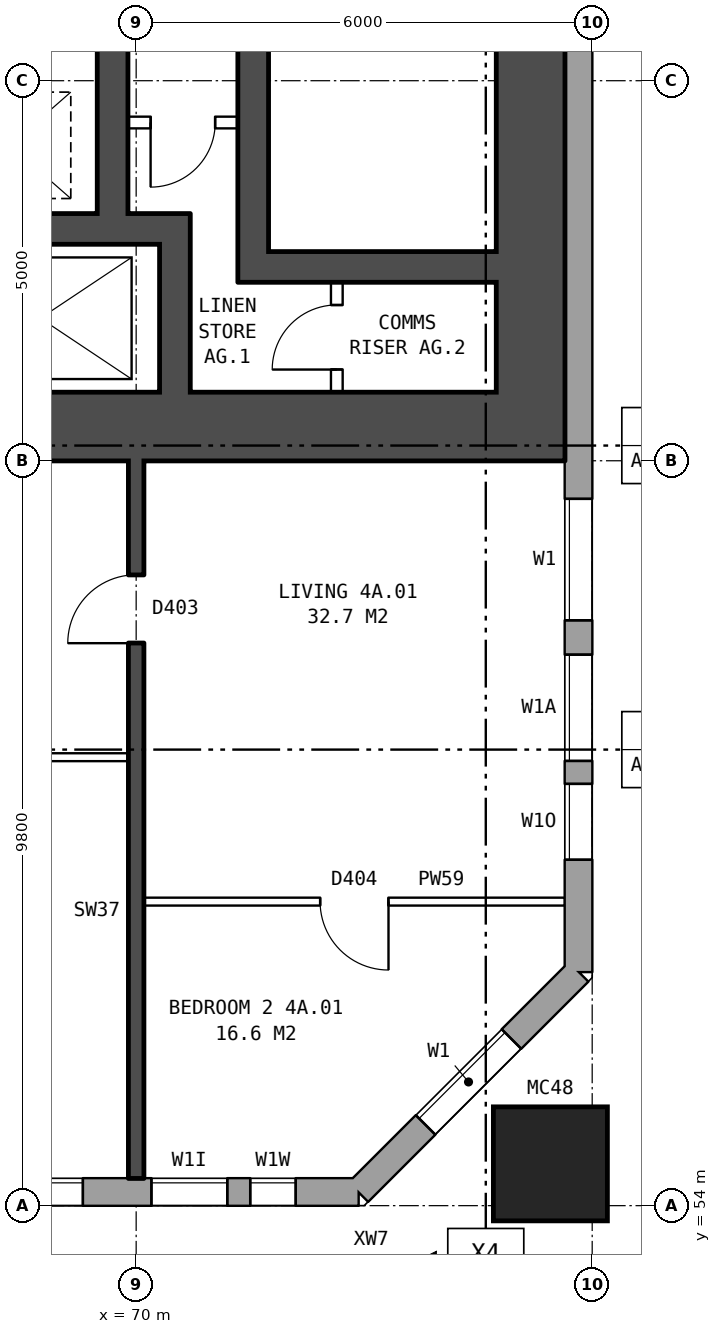
"""IFC4 building model, lengths in metres.
Left out: names, types, materials, properties, quantities, classifications, styles, units other than length and angle.
Written with IfcOpenShell. Run it as: python <this file> out.ifc"""

import sys

from ifc_helpers import new_model, si_unit, direction, frame, frame_2d, origin, origin_2d, place, context, subcontext, project, spatial, rectangle, hollow_rectangle, extrude, element, fill, save


model = new_model("IFC4")
c1 = context("Model", 3, precision=1e-05, world=origin(), true_north=direction((0.0, 1.0)))
c2 = subcontext(c1, "Body", "Model", "MODEL_VIEW")
j1 = project(units=[si_unit("LENGTHUNIT", "METRE"), si_unit("PLANEANGLEUNIT", "RADIAN")], contexts=[c1])
p1 = place(None, origin())
s1 = spatial("IfcSite", under=j1, at=p1, CompositionType="ELEMENT")
p2 = place(p1, origin())
s2 = spatial("IfcBuilding", under=s1, at=p2, CompositionType="ELEMENT")
p3 = place(p2, frame((0.0, 0.0, 19.5)))
s3 = spatial("IfcBuildingStorey", under=s2, at=p3, CompositionType="ELEMENT", Elevation=19.5)
p4 = place(p3, frame((75.45, 54.55, 0.0), z_axis=(0.0, 0.0, 1.0), x_axis=(1.0, 0.0, 0.0)))
e1 = element("IfcColumn", 1, at=p4, inside=s3, PredefinedType="COLUMN", context=c2, shape_type="SweptSolid", body=[
    extrude(hollow_rectangle(XDim=1.5, YDim=1.5, WallThickness=0.08, at=origin_2d()), origin(), (0.0, 0.0, 1.0), 3.1),
])
p5 = place(p3, frame((22.825, 54.18, 0.0), z_axis=(0.0, 0.0, 1.0), x_axis=(1.0, 0.0, 0.0)))
e2 = element("IfcWall", 2, at=p5, inside=s3, PredefinedType="STANDARD", context=c2, shape_type="SweptSolid", body=[
    extrude(rectangle(XDim=50.101, YDim=0.36, at=frame_2d((25.05, 0.0))), origin(), (0.0, 0.0, 1.0), 2.85),
])
p6 = place(p5, frame((2.875, 0.0, 0.8)))
e3 = element("IfcOpeningElement", 3, at=p6, cuts=e2, PredefinedType="OPENING", context=c2, shape_type="SweptSolid", body=[
    extrude(rectangle(XDim=1.6, YDim=1.8, at=frame_2d((0.8, 0.9))), frame((0.0, 0.19, 0.0), z_axis=(0.0, -1.0, 0.0), x_axis=(1.0, 0.0, 0.0)), (0.0, 0.0, 1.0), 0.38),
])
p7 = place(p5, frame((5.875, 0.0, 0.8)))
e4 = element("IfcOpeningElement", 4, at=p7, cuts=e2, PredefinedType="OPENING", context=c2, shape_type="SweptSolid", body=[
    extrude(rectangle(XDim=1.6, YDim=1.8, at=frame_2d((0.8, 0.9))), frame((0.0, 0.19, 0.0), z_axis=(0.0, -1.0, 0.0), x_axis=(1.0, 0.0, 0.0)), (0.0, 0.0, 1.0), 0.38),
])
p8 = place(p5, frame((8.875, 0.0, 0.8)))
e5 = element("IfcOpeningElement", 5, at=p8, cuts=e2, PredefinedType="OPENING", context=c2, shape_type="SweptSolid", body=[
    extrude(rectangle(XDim=1.6, YDim=1.8, at=frame_2d((0.8, 0.9))), frame((0.0, 0.19, 0.0), z_axis=(0.0, -1.0, 0.0), x_axis=(1.0, 0.0, 0.0)), (0.0, 0.0, 1.0), 0.38),
])
p9 = place(p5, frame((11.875, 0.0, 0.8)))
e6 = element("IfcOpeningElement", 6, at=p9, cuts=e2, PredefinedType="OPENING", context=c2, shape_type="SweptSolid", body=[
    extrude(rectangle(XDim=1.6, YDim=1.8, at=frame_2d((0.8, 0.9))), frame((0.0, 0.19, 0.0), z_axis=(0.0, -1.0, 0.0), x_axis=(1.0, 0.0, 0.0)), (0.0, 0.0, 1.0), 0.38),
])
p10 = place(p5, frame((14.875, 0.0, 0.8)))
e7 = element("IfcOpeningElement", 7, at=p10, cuts=e2, PredefinedType="OPENING", context=c2, shape_type="SweptSolid", body=[
    extrude(rectangle(XDim=1.6, YDim=1.8, at=frame_2d((0.8, 0.9))), frame((0.0, 0.19, 0.0), z_axis=(0.0, -1.0, 0.0), x_axis=(1.0, 0.0, 0.0)), (0.0, 0.0, 1.0), 0.38),
])
p11 = place(p5, frame((17.875, 0.0, 0.8)))
e8 = element("IfcOpeningElement", 8, at=p11, cuts=e2, PredefinedType="OPENING", context=c2, shape_type="SweptSolid", body=[
    extrude(rectangle(XDim=1.6, YDim=1.8, at=frame_2d((0.8, 0.9))), frame((0.0, 0.19, 0.0), z_axis=(0.0, -1.0, 0.0), x_axis=(1.0, 0.0, 0.0)), (0.0, 0.0, 1.0), 0.38),
])
p12 = place(p5, frame((20.875, 0.0, 0.8)))
e9 = element("IfcOpeningElement", 9, at=p12, cuts=e2, PredefinedType="OPENING", context=c2, shape_type="SweptSolid", body=[
    extrude(rectangle(XDim=1.6, YDim=1.8, at=frame_2d((0.8, 0.9))), frame((0.0, 0.19, 0.0), z_axis=(0.0, -1.0, 0.0), x_axis=(1.0, 0.0, 0.0)), (0.0, 0.0, 1.0), 0.38),
])
p13 = place(p5, frame((23.875, 0.0, 0.8)))
e10 = element("IfcOpeningElement", 10, at=p13, cuts=e2, PredefinedType="OPENING", context=c2, shape_type="SweptSolid", body=[
    extrude(rectangle(XDim=1.6, YDim=1.8, at=frame_2d((0.8, 0.9))), frame((0.0, 0.19, 0.0), z_axis=(0.0, -1.0, 0.0), x_axis=(1.0, 0.0, 0.0)), (0.0, 0.0, 1.0), 0.38),
])
p14 = place(p5, frame((26.875, 0.0, 0.8)))
e11 = element("IfcOpeningElement", 11, at=p14, cuts=e2, PredefinedType="OPENING", context=c2, shape_type="SweptSolid", body=[
    extrude(rectangle(XDim=1.6, YDim=1.8, at=frame_2d((0.8, 0.9))), frame((0.0, 0.19, 0.0), z_axis=(0.0, -1.0, 0.0), x_axis=(1.0, 0.0, 0.0)), (0.0, 0.0, 1.0), 0.38),
])
p15 = place(p5, frame((29.875, 0.0, 0.8)))
e12 = element("IfcOpeningElement", 12, at=p15, cuts=e2, PredefinedType="OPENING", context=c2, shape_type="SweptSolid", body=[
    extrude(rectangle(XDim=1.6, YDim=1.8, at=frame_2d((0.8, 0.9))), frame((0.0, 0.19, 0.0), z_axis=(0.0, -1.0, 0.0), x_axis=(1.0, 0.0, 0.0)), (0.0, 0.0, 1.0), 0.38),
])
p16 = place(p5, frame((32.875, 0.0, 0.8)))
e13 = element("IfcOpeningElement", 13, at=p16, cuts=e2, PredefinedType="OPENING", context=c2, shape_type="SweptSolid", body=[
    extrude(rectangle(XDim=1.6, YDim=1.8, at=frame_2d((0.8, 0.9))), frame((0.0, 0.19, 0.0), z_axis=(0.0, -1.0, 0.0), x_axis=(1.0, 0.0, 0.0)), (0.0, 0.0, 1.0), 0.38),
])
p17 = place(p5, frame((35.875, 0.0, 0.8)))
e14 = element("IfcOpeningElement", 14, at=p17, cuts=e2, PredefinedType="OPENING", context=c2, shape_type="SweptSolid", body=[
    extrude(rectangle(XDim=1.6, YDim=1.8, at=frame_2d((0.8, 0.9))), frame((0.0, 0.19, 0.0), z_axis=(0.0, -1.0, 0.0), x_axis=(1.0, 0.0, 0.0)), (0.0, 0.0, 1.0), 0.38),
])
p18 = place(p5, frame((38.875, 0.0, 0.8)))
e15 = element("IfcOpeningElement", 15, at=p18, cuts=e2, PredefinedType="OPENING", context=c2, shape_type="SweptSolid", body=[
    extrude(rectangle(XDim=1.6, YDim=1.8, at=frame_2d((0.8, 0.9))), frame((0.0, 0.19, 0.0), z_axis=(0.0, -1.0, 0.0), x_axis=(1.0, 0.0, 0.0)), (0.0, 0.0, 1.0), 0.38),
])
p19 = place(p5, frame((41.875, 0.0, 0.8)))
e16 = element("IfcOpeningElement", 16, at=p19, cuts=e2, PredefinedType="OPENING", context=c2, shape_type="SweptSolid", body=[
    extrude(rectangle(XDim=1.6, YDim=1.8, at=frame_2d((0.8, 0.9))), frame((0.0, 0.19, 0.0), z_axis=(0.0, -1.0, 0.0), x_axis=(1.0, 0.0, 0.0)), (0.0, 0.0, 1.0), 0.38),
])
p20 = place(p5, frame((44.875, 0.0, 0.8)))
e17 = element("IfcOpeningElement", 17, at=p20, cuts=e2, PredefinedType="OPENING", context=c2, shape_type="SweptSolid", body=[
    extrude(rectangle(XDim=1.6, YDim=1.8, at=frame_2d((0.8, 0.9))), frame((0.0, 0.19, 0.0), z_axis=(0.0, -1.0, 0.0), x_axis=(1.0, 0.0, 0.0)), (0.0, 0.0, 1.0), 0.38),
])
p21 = place(p5, frame((47.375, 0.0, 0.8)))
e18 = element("IfcOpeningElement", 18, at=p21, cuts=e2, PredefinedType="OPENING", context=c2, shape_type="SweptSolid", body=[
    extrude(rectangle(XDim=1.0, YDim=1.5, at=frame_2d((0.5, 0.75))), frame((0.0, 0.19, 0.0), z_axis=(0.0, -1.0, 0.0), x_axis=(1.0, 0.0, 0.0)), (0.0, 0.0, 1.0), 0.38),
])
p22 = place(p5, frame((48.675, 0.0, 0.8)))
e19 = element("IfcOpeningElement", 19, at=p22, cuts=e2, PredefinedType="OPENING", context=c2, shape_type="SweptSolid", body=[
    extrude(rectangle(XDim=0.6, YDim=0.9, at=frame_2d((0.3, 0.45))), frame((0.0, 0.19, 0.0), z_axis=(0.0, -1.0, 0.0), x_axis=(1.0, 0.0, 0.0)), (0.0, 0.0, 1.0), 0.38),
])
p23 = place(p3, frame((72.925, 54.18, 0.0), z_axis=(0.0, 0.0, 1.0), x_axis=(0.707106781187, 0.707106781187, 0.0)))
e20 = element("IfcWall", 20, at=p23, inside=s3, PredefinedType="STANDARD", context=c2, shape_type="SweptSolid", body=[
    extrude(rectangle(XDim=4.094, YDim=0.36, at=frame_2d((2.047, 0.0))), origin(), (0.0, 0.0, 1.0), 2.85),
])
p24 = place(p23, frame((1.247, 0.0, 0.8)))
e21 = element("IfcOpeningElement", 21, at=p24, cuts=e20, PredefinedType="OPENING", context=c2, shape_type="SweptSolid", body=[
    extrude(rectangle(XDim=1.6, YDim=1.8, at=frame_2d((0.8, 0.9))), frame((0.0, 0.19, 0.0), z_axis=(0.0, -1.0, 0.0), x_axis=(1.0, 0.0, 0.0)), (0.0, 0.0, 1.0), 0.38),
])
p25 = place(p3, frame((75.82, 57.075, 0.0), z_axis=(0.0, 0.0, 1.0), x_axis=(0.0, 1.0, 0.0)))
e22 = element("IfcWall", 22, at=p25, inside=s3, PredefinedType="STANDARD", context=c2, shape_type="SweptSolid", body=[
    extrude(rectangle(XDim=25.851, YDim=0.36, at=frame_2d((12.925, 0.0))), origin(), (0.0, 0.0, 1.0), 2.85),
])
p26 = place(p25, frame((1.475, 0.0, 0.8)))
e23 = element("IfcOpeningElement", 23, at=p26, cuts=e22, PredefinedType="OPENING", context=c2, shape_type="SweptSolid", body=[
    extrude(rectangle(XDim=1.0, YDim=1.2, at=frame_2d((0.5, 0.6))), frame((0.0, 0.19, 0.0), z_axis=(0.0, -1.0, 0.0), x_axis=(1.0, 0.0, 0.0)), (0.0, 0.0, 1.0), 0.38),
])
p27 = place(p25, frame((4.625, 0.0, 0.8)))
e24 = element("IfcOpeningElement", 24, at=p27, cuts=e22, PredefinedType="OPENING", context=c2, shape_type="SweptSolid", body=[
    extrude(rectangle(XDim=1.6, YDim=1.8, at=frame_2d((0.8, 0.9))), frame((0.0, 0.19, 0.0), z_axis=(0.0, -1.0, 0.0), x_axis=(1.0, 0.0, 0.0)), (0.0, 0.0, 1.0), 0.38),
])
p28 = place(p25, frame((19.625, 0.0, 0.8)))
e25 = element("IfcOpeningElement", 25, at=p28, cuts=e22, PredefinedType="OPENING", context=c2, shape_type="SweptSolid", body=[
    extrude(rectangle(XDim=1.6, YDim=1.8, at=frame_2d((0.8, 0.9))), frame((0.0, 0.19, 0.0), z_axis=(0.0, -1.0, 0.0), x_axis=(1.0, 0.0, 0.0)), (0.0, 0.0, 1.0), 0.38),
])
p29 = place(p25, frame((21.525, 0.0, 0.8)))
e26 = element("IfcOpeningElement", 26, at=p29, cuts=e22, PredefinedType="OPENING", context=c2, shape_type="SweptSolid", body=[
    extrude(rectangle(XDim=1.4, YDim=1.8, at=frame_2d((0.7, 0.9))), frame((0.0, 0.19, 0.0), z_axis=(0.0, -1.0, 0.0), x_axis=(1.0, 0.0, 0.0)), (0.0, 0.0, 1.0), 0.38),
])
p30 = place(p25, frame((2.775, 0.0, 0.8)))
e27 = element("IfcOpeningElement", 27, at=p30, cuts=e22, PredefinedType="OPENING", context=c2, shape_type="SweptSolid", body=[
    extrude(rectangle(XDim=1.4, YDim=1.8, at=frame_2d((0.7, 0.9))), frame((0.0, 0.19, 0.0), z_axis=(0.0, -1.0, 0.0), x_axis=(1.0, 0.0, 0.0)), (0.0, 0.0, 1.0), 0.38),
])
p31 = place(p25, frame((23.225, 0.0, 0.8)))
e28 = element("IfcOpeningElement", 28, at=p31, cuts=e22, PredefinedType="OPENING", context=c2, shape_type="SweptSolid", body=[
    extrude(rectangle(XDim=1.0, YDim=1.2, at=frame_2d((0.5, 0.6))), frame((0.0, 0.19, 0.0), z_axis=(0.0, -1.0, 0.0), x_axis=(1.0, 0.0, 0.0)), (0.0, 0.0, 1.0), 0.38),
])
p32 = place(p3, frame((75.19, 64.7, 0.0), z_axis=(0.0, 0.0, 1.0), x_axis=(0.0, 1.0, 0.0)))
e29 = element("IfcWall", 29, at=p32, inside=s3, PredefinedType="SHEAR", context=c2, shape_type="SweptSolid", body=[
    extrude(rectangle(XDim=10.6, YDim=0.9, at=frame_2d((5.3, 0.0))), origin(), (0.0, 0.0, 1.0), 2.85),
])
p33 = place(p3, frame((66.64, 64.25, 0.0), z_axis=(0.0, 0.0, 1.0), x_axis=(1.0, 0.0, 0.0)))
e30 = element("IfcWall", 30, at=p33, inside=s3, PredefinedType="SHEAR", context=c2, shape_type="SweptSolid", body=[
    extrude(rectangle(XDim=9.0, YDim=0.9, at=frame_2d((4.5, 0.0))), origin(), (0.0, 0.0, 1.0), 2.85),
])
p34 = place(p3, frame((71.74, 66.35, 0.0), z_axis=(0.0, 0.0, 1.0), x_axis=(1.0, 0.0, 0.0)))
e31 = element("IfcWall", 31, at=p34, inside=s3, PredefinedType="SHEAR", context=c2, shape_type="SweptSolid", body=[
    extrude(rectangle(XDim=3.0, YDim=0.4, at=frame_2d((1.5, 0.0))), origin(), (0.0, 0.0, 1.0), 2.85),
])
p35 = place(p3, frame((67.54, 66.85, 0.0), z_axis=(0.0, 0.0, 1.0), x_axis=(1.0, 0.0, 0.0)))
e32 = element("IfcWall", 32, at=p35, inside=s3, PredefinedType="SHEAR", context=c2, shape_type="SweptSolid", body=[
    extrude(rectangle(XDim=3.17, YDim=0.4, at=frame_2d((1.585, 0.0))), origin(), (0.0, 0.0, 1.0), 2.85),
])
p36 = place(p3, frame((69.89, 68.25, 0.0), z_axis=(0.0, 0.0, 1.0), x_axis=(1.0, 0.0, 0.0)))
e33 = element("IfcWall", 33, at=p36, inside=s3, PredefinedType="PARTITIONING", context=c2, shape_type="SweptSolid", body=[
    extrude(rectangle(XDim=1.45, YDim=0.15, at=frame_2d((0.725, 0.0))), origin(), (0.0, 0.0, 1.0), 2.85),
])
p37 = place(p36, frame((0.3, 0.0, 0.0)))
e34 = element("IfcOpeningElement", 34, at=p37, cuts=e33, PredefinedType="OPENING", context=c2, shape_type="SweptSolid", body=[
    extrude(rectangle(XDim=0.85, YDim=2.1, at=frame_2d((0.425, 1.05))), frame((0.0, 0.085, 0.0), z_axis=(0.0, -1.0, 0.0), x_axis=(1.0, 0.0, 0.0)), (0.0, 0.0, 1.0), 0.17),
])
p38 = place(p3, frame((69.69, 67.05, 0.0), z_axis=(0.0, 0.0, 1.0), x_axis=(0.0, 1.0, 0.0)))
e35 = element("IfcWall", 35, at=p38, inside=s3, PredefinedType="SHEAR", context=c2, shape_type="SweptSolid", body=[
    extrude(rectangle(XDim=6.6, YDim=0.4, at=frame_2d((3.3, 0.0))), origin(), (0.0, 0.0, 1.0), 2.85),
])
p39 = place(p3, frame((70.51, 64.7, 0.0), z_axis=(0.0, 0.0, 1.0), x_axis=(0.0, 1.0, 0.0)))
e36 = element("IfcWall", 36, at=p39, inside=s3, PredefinedType="SHEAR", context=c2, shape_type="SweptSolid", body=[
    extrude(rectangle(XDim=1.95, YDim=0.4, at=frame_2d((0.975, 0.0))), origin(), (0.0, 0.0, 1.0), 2.85),
])
p40 = place(p3, frame((71.54, 66.15, 0.0), z_axis=(0.0, 0.0, 1.0), x_axis=(0.0, 1.0, 0.0)))
e37 = element("IfcWall", 37, at=p40, inside=s3, PredefinedType="SHEAR", context=c2, shape_type="SweptSolid", body=[
    extrude(rectangle(XDim=7.5, YDim=0.4, at=frame_2d((3.75, 0.0))), origin(), (0.0, 0.0, 1.0), 2.85),
])
p41 = place(p3, frame((72.64, 64.7, 0.0), z_axis=(0.0, 0.0, 1.0), x_axis=(0.0, 1.0, 0.0)))
e38 = element("IfcWall", 38, at=p41, inside=s3, PredefinedType="PARTITIONING", context=c2, shape_type="SweptSolid", body=[
    extrude(rectangle(XDim=1.45, YDim=0.15, at=frame_2d((0.725, 0.0))), origin(), (0.0, 0.0, 1.0), 2.85),
])
p42 = place(p41, frame((0.3, 0.0, 0.0)))
e39 = element("IfcOpeningElement", 39, at=p42, cuts=e38, PredefinedType="OPENING", context=c2, shape_type="SweptSolid", body=[
    extrude(rectangle(XDim=0.85, YDim=2.1, at=frame_2d((0.425, 1.05))), frame((0.0, 0.085, 0.0), z_axis=(0.0, -1.0, 0.0), x_axis=(1.0, 0.0, 0.0)), (0.0, 0.0, 1.0), 0.17),
])
p43 = place(p3, frame((70.1, 58.0, 0.0), z_axis=(0.0, 0.0, 1.0), x_axis=(1.0, 0.0, 0.0)))
e40 = element("IfcWall", 40, at=p43, inside=s3, PredefinedType="PARTITIONING", context=c2, shape_type="SweptSolid", body=[
    extrude(rectangle(XDim=5.54, YDim=0.1, at=frame_2d((2.77, 0.0))), origin(), (0.0, 0.0, 1.0), 2.85),
])
p44 = place(p43, frame((2.32, 0.0, 0.0)))
e41 = element("IfcOpeningElement", 41, at=p44, cuts=e40, PredefinedType="OPENING", context=c2, shape_type="SweptSolid", body=[
    extrude(rectangle(XDim=0.9, YDim=2.1, at=frame_2d((0.45, 1.05))), frame((0.0, 0.06, 0.0), z_axis=(0.0, -1.0, 0.0), x_axis=(1.0, 0.0, 0.0)), (0.0, 0.0, 1.0), 0.12),
])
p45 = place(p3, frame((64.1, 59.9, 0.0), z_axis=(0.0, 0.0, 1.0), x_axis=(1.0, 0.0, 0.0)))
e42 = element("IfcWall", 42, at=p45, inside=s3, PredefinedType="PARTITIONING", context=c2, shape_type="SweptSolid", body=[
    extrude(rectangle(XDim=5.8, YDim=0.1, at=frame_2d((2.9, 0.0))), origin(), (0.0, 0.0, 1.0), 2.85),
])
p46 = place(p45, frame((3.6, 0.0, 0.0)))
e43 = element("IfcOpeningElement", 43, at=p46, cuts=e42, PredefinedType="OPENING", context=c2, shape_type="SweptSolid", body=[
    extrude(rectangle(XDim=0.9, YDim=2.1, at=frame_2d((0.45, 1.05))), frame((0.0, 0.06, 0.0), z_axis=(0.0, -1.0, 0.0), x_axis=(1.0, 0.0, 0.0)), (0.0, 0.0, 1.0), 0.12),
])
p47 = place(p45, frame((0.7, 0.0, 0.0)))
e44 = element("IfcOpeningElement", 44, at=p47, cuts=e42, PredefinedType="OPENING", context=c2, shape_type="SweptSolid", body=[
    extrude(rectangle(XDim=0.9, YDim=2.1, at=frame_2d((0.45, 1.05))), frame((0.0, 0.06, 0.0), z_axis=(0.0, -1.0, 0.0), x_axis=(1.0, 0.0, 0.0)), (0.0, 0.0, 1.0), 0.12),
])
p48 = place(p3, frame((70.0, 54.36, 0.0), z_axis=(0.0, 0.0, 1.0), x_axis=(0.0, 1.0, 0.0)))
e45 = element("IfcWall", 45, at=p48, inside=s3, PredefinedType="SOLIDWALL", context=c2, shape_type="SweptSolid", body=[
    extrude(rectangle(XDim=9.44, YDim=0.2, at=frame_2d((4.72, 0.0))), origin(), (0.0, 0.0, 1.0), 2.85),
])
p49 = place(p48, frame((7.04, 0.0, 0.0)))
e46 = element("IfcOpeningElement", 46, at=p49, cuts=e45, PredefinedType="OPENING", context=c2, shape_type="SweptSolid", body=[
    extrude(rectangle(XDim=0.9, YDim=2.1, at=frame_2d((0.45, 1.05))), frame((0.0, 0.11, 0.0), z_axis=(0.0, -1.0, 0.0), x_axis=(1.0, 0.0, 0.0)), (0.0, 0.0, 1.0), 0.22),
])
p50 = place(p20, origin())
e47 = element("IfcWindow", 47, at=p50, inside=s3, PartitioningType="SINGLE_PANEL", PredefinedType="WINDOW", context=c2, shape_type="SweptSolid", body=[
    extrude(rectangle(XDim=1.6, YDim=1.8, at=frame_2d((0.8, 0.9))), frame((0.0, 0.15, 0.0), z_axis=(0.0, -1.0, 0.0), x_axis=(1.0, 0.0, 0.0)), (0.0, 0.0, 1.0), 0.06),
])
fill(e17, e47)
p51 = place(p21, origin())
e48 = element("IfcWindow", 48, at=p51, inside=s3, PartitioningType="SINGLE_PANEL", PredefinedType="WINDOW", context=c2, shape_type="SweptSolid", body=[
    extrude(rectangle(XDim=1.0, YDim=1.5, at=frame_2d((0.5, 0.75))), frame((0.0, 0.15, 0.0), z_axis=(0.0, -1.0, 0.0), x_axis=(1.0, 0.0, 0.0)), (0.0, 0.0, 1.0), 0.06),
])
fill(e18, e48)
p52 = place(p24, origin())
e49 = element("IfcWindow", 49, at=p52, inside=s3, PartitioningType="SINGLE_PANEL", PredefinedType="WINDOW", context=c2, shape_type="SweptSolid", body=[
    extrude(rectangle(XDim=1.6, YDim=1.8, at=frame_2d((0.8, 0.9))), frame((0.0, 0.15, 0.0), z_axis=(0.0, -1.0, 0.0), x_axis=(1.0, 0.0, 0.0)), (0.0, 0.0, 1.0), 0.06),
])
fill(e21, e49)
p53 = place(p26, origin())
e50 = element("IfcWindow", 50, at=p53, inside=s3, PartitioningType="SINGLE_PANEL", PredefinedType="WINDOW", context=c2, shape_type="SweptSolid", body=[
    extrude(rectangle(XDim=1.0, YDim=1.2, at=frame_2d((0.5, 0.6))), frame((0.0, 0.15, 0.0), z_axis=(0.0, -1.0, 0.0), x_axis=(1.0, 0.0, 0.0)), (0.0, 0.0, 1.0), 0.06),
])
fill(e23, e50)
p54 = place(p27, origin())
e51 = element("IfcWindow", 51, at=p54, inside=s3, PartitioningType="SINGLE_PANEL", PredefinedType="WINDOW", context=c2, shape_type="SweptSolid", body=[
    extrude(rectangle(XDim=1.6, YDim=1.8, at=frame_2d((0.8, 0.9))), frame((0.0, 0.15, 0.0), z_axis=(0.0, -1.0, 0.0), x_axis=(1.0, 0.0, 0.0)), (0.0, 0.0, 1.0), 0.06),
])
fill(e24, e51)
p55 = place(p37, frame((0.85, 0.0, 0.0), z_axis=(0.0, 0.0, 1.0), x_axis=(-1.0, 0.0, 0.0)))
e52 = element("IfcDoor", 52, at=p55, inside=s3, OperationType="SINGLE_SWING_RIGHT", PredefinedType="DOOR", context=c2, shape_type="SweptSolid", body=[
    extrude(rectangle(XDim=0.85, YDim=2.1, at=frame_2d((0.425, 1.05))), frame((0.0, 0.025, 0.0), z_axis=(0.0, -1.0, 0.0), x_axis=(1.0, 0.0, 0.0)), (0.0, 0.0, 1.0), 0.05),
])
fill(e34, e52)
p56 = place(p42, origin())
e53 = element("IfcDoor", 53, at=p56, inside=s3, OperationType="SINGLE_SWING_LEFT", PredefinedType="DOOR", context=c2, shape_type="SweptSolid", body=[
    extrude(rectangle(XDim=0.85, YDim=2.1, at=frame_2d((0.425, 1.05))), frame((0.0, 0.025, 0.0), z_axis=(0.0, -1.0, 0.0), x_axis=(1.0, 0.0, 0.0)), (0.0, 0.0, 1.0), 0.05),
])
fill(e39, e53)
p57 = place(p44, frame((0.9, 0.0, 0.0), z_axis=(0.0, 0.0, 1.0), x_axis=(-1.0, 0.0, 0.0)))
e54 = element("IfcDoor", 54, at=p57, inside=s3, OperationType="SINGLE_SWING_LEFT", PredefinedType="DOOR", context=c2, shape_type="SweptSolid", body=[
    extrude(rectangle(XDim=0.9, YDim=2.1, at=frame_2d((0.45, 1.05))), frame((0.0, 0.025, 0.0), z_axis=(0.0, -1.0, 0.0), x_axis=(1.0, 0.0, 0.0)), (0.0, 0.0, 1.0), 0.05),
])
fill(e41, e54)
p58 = place(p49, origin())
e55 = element("IfcDoor", 55, at=p58, inside=s3, OperationType="SINGLE_SWING_LEFT", PredefinedType="DOOR", context=c2, shape_type="SweptSolid", body=[
    extrude(rectangle(XDim=0.9, YDim=2.1, at=frame_2d((0.45, 1.05))), frame((0.0, 0.025, 0.0), z_axis=(0.0, -1.0, 0.0), x_axis=(1.0, 0.0, 0.0)), (0.0, 0.0, 1.0), 0.05),
])
fill(e46, e55)
p59 = place(p22, origin())
e56 = element("IfcWindow", 56, at=p59, inside=s3, PartitioningType="SINGLE_PANEL", PredefinedType="WINDOW", context=c2, shape_type="SweptSolid", body=[
    extrude(rectangle(XDim=0.6, YDim=0.9, at=frame_2d((0.3, 0.45))), frame((0.0, 0.15, 0.0), z_axis=(0.0, -1.0, 0.0), x_axis=(1.0, 0.0, 0.0)), (0.0, 0.0, 1.0), 0.06),
])
fill(e19, e56)
p60 = place(p30, origin())
e57 = element("IfcWindow", 57, at=p60, inside=s3, PartitioningType="SINGLE_PANEL", PredefinedType="WINDOW", context=c2, shape_type="SweptSolid", body=[
    extrude(rectangle(XDim=1.4, YDim=1.8, at=frame_2d((0.7, 0.9))), frame((0.0, 0.15, 0.0), z_axis=(0.0, -1.0, 0.0), x_axis=(1.0, 0.0, 0.0)), (0.0, 0.0, 1.0), 0.06),
])
fill(e27, e57)
save(model, sys.argv[1])
